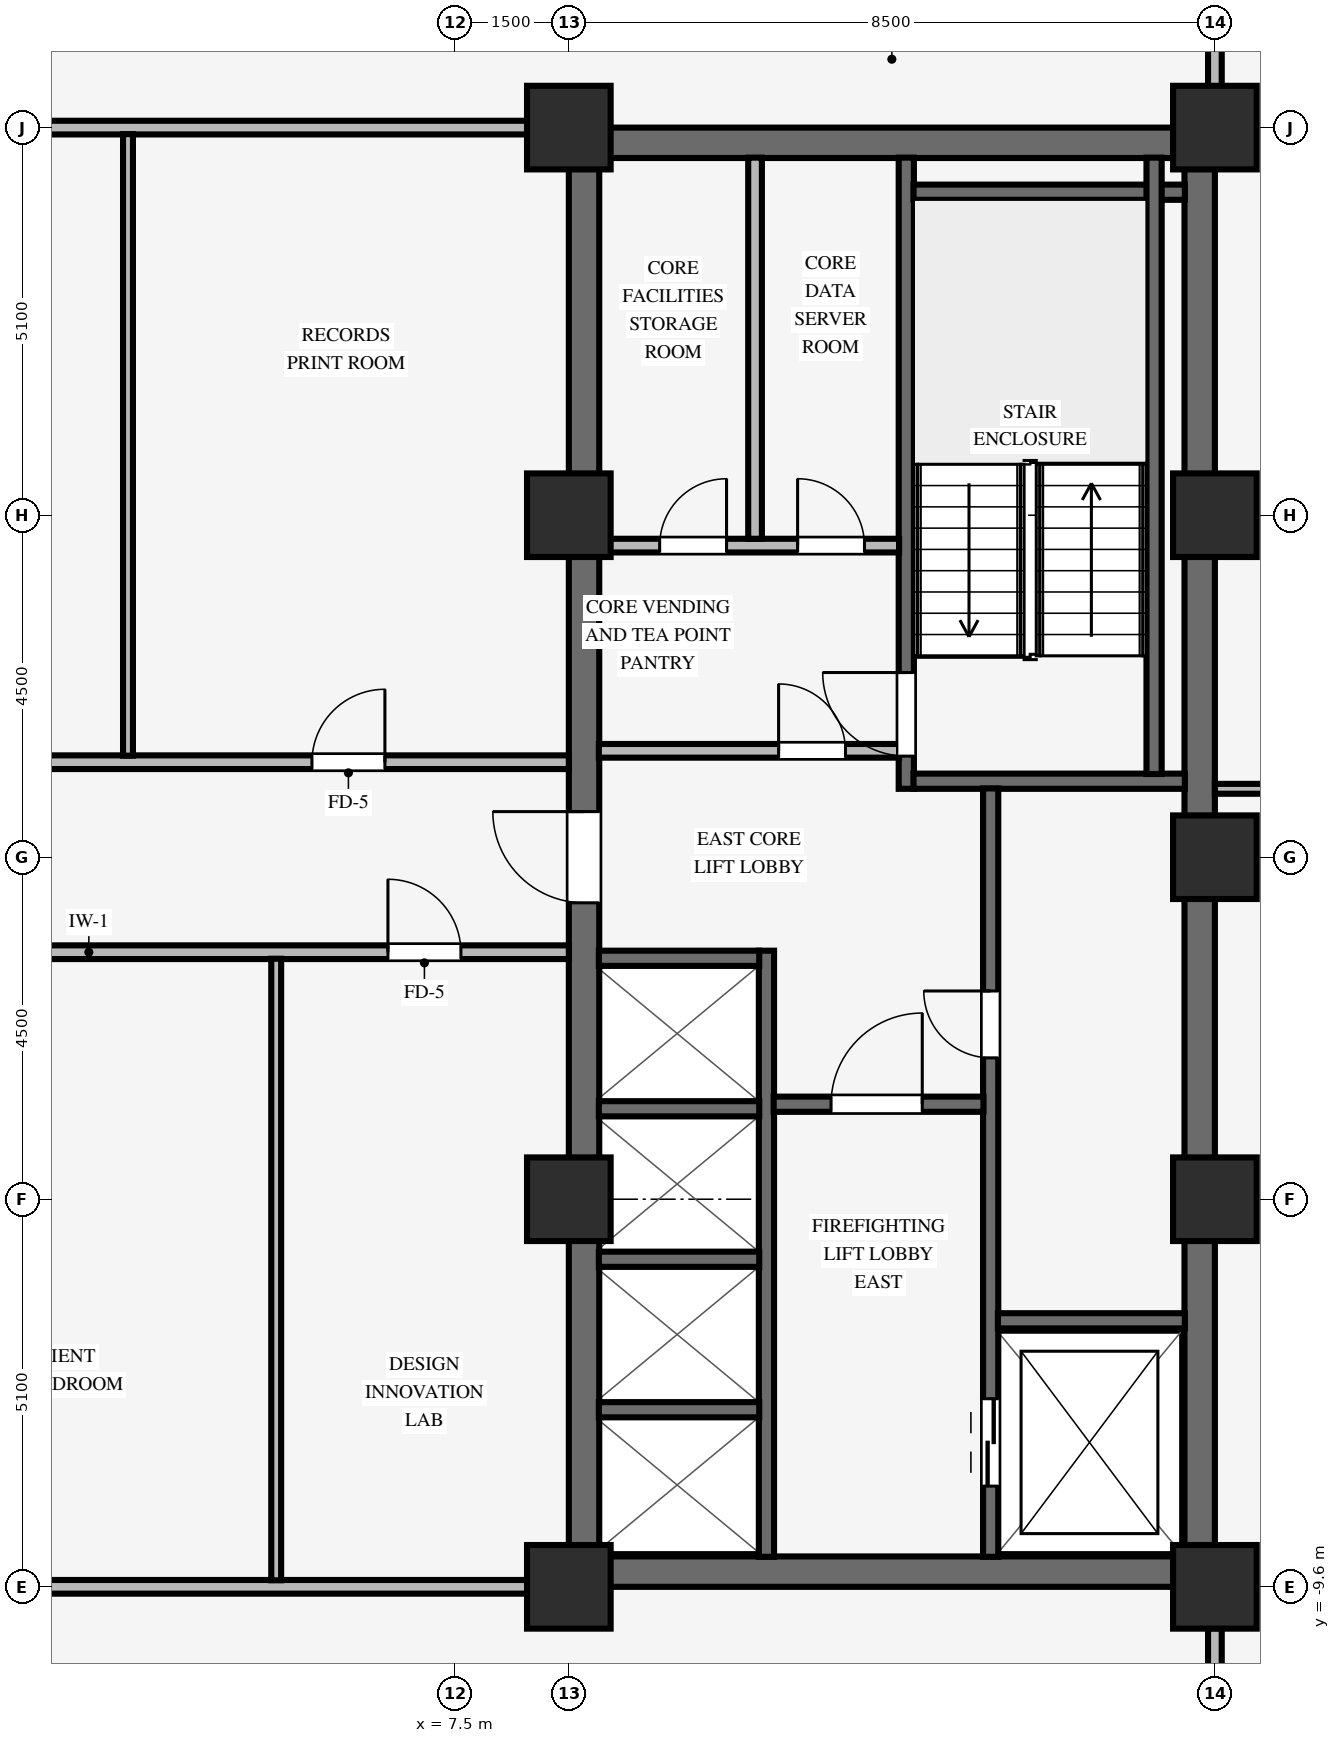
"""IFC4 building model, lengths in metres.
Left out: names, types, materials, properties, quantities, classifications, styles, units other than length and angle.
Written with IfcOpenShell. Run it as: python <this file> out.ifc"""

import sys

from ifc_helpers import new_model, si_unit, direction, frame, frame_2d, origin, origin_2d, place, context, subcontext, project, spatial, rectangle, extrude, source, transform, mapped, element, fill, save


model = new_model("IFC4")
c1 = context("Model", 3, precision=1e-05, world=origin(), true_north=direction((0.0, 1.0)))
c2 = subcontext(c1, "Body", "Model", "MODEL_VIEW")
j1 = project(units=[si_unit("LENGTHUNIT", "METRE"), si_unit("PLANEANGLEUNIT", "RADIAN")], contexts=[c1])
p1 = place(None, origin())
s1 = spatial("IfcSite", under=j1, at=p1, CompositionType="ELEMENT")
p2 = place(p1, origin())
s2 = spatial("IfcBuilding", under=s1, at=p2, CompositionType="ELEMENT")
p3 = place(p2, frame((0.0, 0.0, 112.9)))
s3 = spatial("IfcBuildingStorey", under=s2, at=p3, CompositionType="ELEMENT", Elevation=112.9)
for number, where, z_axis, x_axis in (
    (1, (9.0, -9.4, 0.0), (0.0, 0.0, 1.0), (1.0, 0.0, 0.0)),
    (2, (9.0, 9.4, 0.0), (0.0, 0.0, 1.0), (1.0, 0.0, 0.0)),
):
    element("IfcWall", number, at=place(p3, frame(where, z_axis=z_axis, x_axis=x_axis)), inside=s3, PredefinedType="SHEAR", context=c2, shape_type="SweptSolid", body=[
        extrude(rectangle(XDim=8.5, YDim=0.4, at=frame_2d((4.25, 0.0))), origin(), (0.0, 0.0, 1.0), 3.25),
    ])
p4 = place(p3, frame((9.2, -9.205, 0.0), z_axis=(0.0, 0.0, 1.0), x_axis=(0.0, 1.0, 0.0)))
e3 = element("IfcWall", 3, at=p4, inside=s3, PredefinedType="SHEAR", context=c2, shape_type="SweptSolid", body=[
    extrude(rectangle(XDim=18.41, YDim=0.4, at=frame_2d((9.205, 0.0))), origin(), (0.0, 0.0, 1.0), 3.25),
])
p5 = place(p4, frame((8.605, 0.0, 0.0)))
e4 = element("IfcOpeningElement", 4, at=p5, cuts=e3, PredefinedType="OPENING", context=c2, shape_type="SweptSolid", body=[
    extrude(rectangle(XDim=1.2, YDim=2.15, at=frame_2d((0.6, 1.075))), frame((0.0, 0.21, 0.0), z_axis=(0.0, -1.0, 0.0), x_axis=(1.0, 0.0, 0.0)), (0.0, 0.0, 1.0), 0.42),
])
p6 = place(p3, frame((17.3, -9.205, 0.0), z_axis=(0.0, 0.0, 1.0), x_axis=(0.0, 1.0, 0.0)))
e5 = element("IfcWall", 5, at=p6, inside=s3, PredefinedType="SHEAR", context=c2, shape_type="SweptSolid", body=[
    extrude(rectangle(XDim=18.41, YDim=0.4, at=frame_2d((9.205, 0.0))), origin(), (0.0, 0.0, 1.0), 3.25),
])
for number, where, z_axis, x_axis in (
    (6, (9.0, -9.6, 0.0), (0.0, 0.0, 1.0), (1.0, 0.0, 0.0)),
    (7, (9.0, -4.5, 0.0), (0.0, 0.0, 1.0), (1.0, 0.0, 0.0)),
    (8, (9.0, 4.5, 0.0), (0.0, 0.0, 1.0), (1.0, 0.0, 0.0)),
    (9, (9.0, 9.6, 0.0), (0.0, 0.0, 1.0), (1.0, 0.0, 0.0)),
    (10, (17.5, -9.6, 0.0), (0.0, 0.0, 1.0), (1.0, 0.0, 0.0)),
    (11, (17.5, -4.5, 0.0), (0.0, 0.0, 1.0), (1.0, 0.0, 0.0)),
    (12, (17.5, 4.5, 0.0), (0.0, 0.0, 1.0), (1.0, 0.0, 0.0)),
    (13, (17.5, 9.6, 0.0), (0.0, 0.0, 1.0), (1.0, 0.0, 0.0)),
    (14, (17.5, 0.0, 0.0), (0.0, 0.0, 1.0), (1.0, 0.0, 0.0)),
):
    element("IfcColumn", number, at=place(p3, frame(where, z_axis=z_axis, x_axis=x_axis)), inside=s3, PredefinedType="COLUMN", context=c2, shape_type="SweptSolid", body=[
        extrude(rectangle(XDim=1.1, YDim=1.1, at=origin_2d()), origin(), (0.0, 0.0, 1.0), 3.25),
    ])
p7 = place(p3, frame((13.44, 0.9, 0.0), z_axis=(0.0, 0.0, 1.0), x_axis=(0.0, 1.0, 0.0)))
e15 = element("IfcWall", 15, at=p7, inside=s3, PredefinedType="SHEAR", context=c2, shape_type="SweptSolid", body=[
    extrude(rectangle(XDim=8.305, YDim=0.2, at=frame_2d((4.153, 0.0))), origin(), (0.0, 0.0, 1.0), 3.25),
])
p8 = place(p7, frame((0.43, 0.0, 0.0)))
e16 = element("IfcOpeningElement", 16, at=p8, cuts=e15, PredefinedType="OPENING", context=c2, shape_type="SweptSolid", body=[
    extrude(rectangle(XDim=1.1, YDim=2.15, at=frame_2d((0.55, 1.075))), frame((0.0, 0.11, 0.0), z_axis=(0.0, -1.0, 0.0), x_axis=(1.0, 0.0, 0.0)), (0.0, 0.0, 1.0), 0.22),
])
for number, where, z_axis, x_axis in (
    (17, (13.535, 1.0, 0.0), (0.0, 0.0, 1.0), (1.0, 0.0, 0.0)),
    (18, (13.535, 8.75, 0.0), (0.0, 0.0, 1.0), (1.0, 0.0, 0.0)),
):
    element("IfcWall", number, at=place(p3, frame(where, z_axis=z_axis, x_axis=x_axis)), inside=s3, PredefinedType="SHEAR", context=c2, shape_type="SweptSolid", body=[
        extrude(rectangle(XDim=3.57, YDim=0.2, at=frame_2d((1.785, 0.0))), origin(), (0.0, 0.0, 1.0), 3.25),
    ])
p9 = place(p3, frame((16.7, 1.095, 0.0), z_axis=(0.0, 0.0, 1.0), x_axis=(0.0, 1.0, 0.0)))
e19 = element("IfcWall", 19, at=p9, inside=s3, PredefinedType="SHEAR", context=c2, shape_type="SweptSolid", body=[
    extrude(rectangle(XDim=8.11, YDim=0.2, at=frame_2d((4.055, 0.0))), origin(), (0.0, 0.0, 1.0), 3.25),
])
p10 = place(p3, frame((14.55, -9.205, 0.0), z_axis=(0.0, 0.0, 1.0), x_axis=(0.0, 1.0, 0.0)))
e20 = element("IfcWall", 20, at=p10, inside=s3, PredefinedType="SHEAR", context=c2, shape_type="SweptSolid", body=[
    extrude(rectangle(XDim=10.11, YDim=0.2, at=frame_2d((5.055, 0.0))), origin(), (0.0, 0.0, 1.0), 3.25),
])
p11 = place(p10, frame((6.565, 0.0, 0.0)))
e21 = element("IfcOpeningElement", 21, at=p11, cuts=e20, PredefinedType="OPENING", context=c2, shape_type="SweptSolid", body=[
    extrude(rectangle(XDim=0.88, YDim=2.1, at=frame_2d((0.44, 1.05))), frame((0.0, 0.11, 0.0), z_axis=(0.0, -1.0, 0.0), x_axis=(1.0, 0.0, 0.0)), (0.0, 0.0, 1.0), 0.22),
])
p12 = place(p10, frame((0.93, 0.0, 0.0)))
e22 = element("IfcOpeningElement", 22, at=p12, cuts=e20, PredefinedType="OPENING", context=c2, shape_type="SweptSolid", body=[
    extrude(rectangle(XDim=1.15, YDim=2.15, at=frame_2d((0.575, 1.075))), frame((0.0, 0.11, 0.0), z_axis=(0.0, -1.0, 0.0), x_axis=(1.0, 0.0, 0.0)), (0.0, 0.0, 1.0), 0.22),
])
p13 = place(p3, frame((14.645, -6.1, 0.0), z_axis=(0.0, 0.0, 1.0), x_axis=(1.0, 0.0, 0.0)))
e23 = element("IfcWall", 23, at=p13, inside=s3, PredefinedType="SHEAR", context=c2, shape_type="SweptSolid", body=[
    extrude(rectangle(XDim=2.46, YDim=0.2, at=frame_2d((1.23, 0.0))), origin(), (0.0, 0.0, 1.0), 3.25),
])
p14 = place(p3, frame((11.6, -9.205, 0.0), z_axis=(0.0, 0.0, 1.0), x_axis=(0.0, 1.0, 0.0)))
e24 = element("IfcWall", 24, at=p14, inside=s3, PredefinedType="SHEAR", context=c2, shape_type="SweptSolid", body=[
    extrude(rectangle(XDim=7.975, YDim=0.2, at=frame_2d((3.988, 0.0))), origin(), (0.0, 0.0, 1.0), 3.25),
])
p15 = place(p3, frame((11.695, -3.25, 0.0), z_axis=(0.0, 0.0, 1.0), x_axis=(1.0, 0.0, 0.0)))
e25 = element("IfcWall", 25, at=p15, inside=s3, PredefinedType="SHEAR", context=c2, shape_type="SweptSolid", body=[
    extrude(rectangle(XDim=2.76, YDim=0.2, at=frame_2d((1.38, 0.0))), origin(), (0.0, 0.0, 1.0), 3.25),
])
p16 = place(p15, frame((0.755, 0.0, 0.0)))
e26 = element("IfcOpeningElement", 26, at=p16, cuts=e25, PredefinedType="OPENING", context=c2, shape_type="SweptSolid", body=[
    extrude(rectangle(XDim=1.2, YDim=2.15, at=frame_2d((0.6, 1.075))), frame((0.0, 0.11, 0.0), z_axis=(0.0, -1.0, 0.0), x_axis=(1.0, 0.0, 0.0)), (0.0, 0.0, 1.0), 0.22),
])
for number, where, z_axis, x_axis in (
    (27, (9.395, -7.27, 0.0), (0.0, 0.0, 1.0), (1.0, 0.0, 0.0)),
    (28, (9.395, -5.29, 0.0), (0.0, 0.0, 1.0), (1.0, 0.0, 0.0)),
    (29, (9.395, -3.31, 0.0), (0.0, 0.0, 1.0), (1.0, 0.0, 0.0)),
    (30, (9.395, -1.33, 0.0), (0.0, 0.0, 1.0), (1.0, 0.0, 0.0)),
):
    element("IfcWall", number, at=place(p3, frame(where, z_axis=z_axis, x_axis=x_axis)), inside=s3, PredefinedType="SHEAR", context=c2, shape_type="SweptSolid", body=[
        extrude(rectangle(XDim=2.11, YDim=0.2, at=frame_2d((1.055, 0.0))), origin(), (0.0, 0.0, 1.0), 3.25),
    ])
p17 = place(p3, frame((9.395, 1.4, 0.0), z_axis=(0.0, 0.0, 1.0), x_axis=(1.0, 0.0, 0.0)))
e31 = element("IfcWall", 31, at=p17, inside=s3, PredefinedType="PARTITIONING", context=c2, shape_type="SweptSolid", body=[
    extrude(rectangle(XDim=3.95, YDim=0.18, at=frame_2d((1.975, 0.0))), origin(), (0.0, 0.0, 1.0), 3.24),
])
p18 = place(p17, frame((2.365, 0.0, 0.0)))
e32 = element("IfcOpeningElement", 32, at=p18, cuts=e31, PredefinedType="OPENING", context=c2, shape_type="SweptSolid", body=[
    extrude(rectangle(XDim=0.88, YDim=2.1, at=frame_2d((0.44, 1.05))), frame((0.0, 0.1, 0.0), z_axis=(0.0, -1.0, 0.0), x_axis=(1.0, 0.0, 0.0)), (0.0, 0.0, 1.0), 0.2),
])
p19 = place(p3, frame((9.395, 4.1, 0.0), z_axis=(0.0, 0.0, 1.0), x_axis=(1.0, 0.0, 0.0)))
e33 = element("IfcWall", 33, at=p19, inside=s3, PredefinedType="PARTITIONING", context=c2, shape_type="SweptSolid", body=[
    extrude(rectangle(XDim=3.95, YDim=0.18, at=frame_2d((1.975, 0.0))), origin(), (0.0, 0.0, 1.0), 3.24),
])
p20 = place(p19, frame((0.8, 0.0, 0.0)))
e34 = element("IfcOpeningElement", 34, at=p20, cuts=e33, PredefinedType="OPENING", context=c2, shape_type="SweptSolid", body=[
    extrude(rectangle(XDim=0.88, YDim=2.1, at=frame_2d((0.44, 1.05))), frame((0.0, 0.1, 0.0), z_axis=(0.0, -1.0, 0.0), x_axis=(1.0, 0.0, 0.0)), (0.0, 0.0, 1.0), 0.2),
])
p21 = place(p19, frame((2.615, 0.0, 0.0)))
e35 = element("IfcOpeningElement", 35, at=p21, cuts=e33, PredefinedType="OPENING", context=c2, shape_type="SweptSolid", body=[
    extrude(rectangle(XDim=0.88, YDim=2.1, at=frame_2d((0.44, 1.05))), frame((0.0, 0.1, 0.0), z_axis=(0.0, -1.0, 0.0), x_axis=(1.0, 0.0, 0.0)), (0.0, 0.0, 1.0), 0.2),
])
p22 = place(p3, frame((11.45, 4.19, 0.0), z_axis=(0.0, 0.0, 1.0), x_axis=(0.0, 1.0, 0.0)))
e36 = element("IfcWall", 36, at=p22, inside=s3, PredefinedType="PARTITIONING", context=c2, shape_type="SweptSolid", body=[
    extrude(rectangle(XDim=5.015, YDim=0.18, at=frame_2d((2.508, 0.0))), origin(), (0.0, 0.0, 1.0), 3.24),
])
p23 = place(p3, frame((0.176, -9.6, 0.0), z_axis=(0.0, 0.0, 1.0), x_axis=(1.0, 0.0, 0.0)))
e37 = element("IfcWall", 37, at=p23, inside=s3, PredefinedType="PARTITIONING", context=c2, shape_type="SweptSolid", body=[
    extrude(rectangle(XDim=8.278, YDim=0.18, at=frame_2d((4.139, 0.0))), origin(), (0.0, 0.0, 1.0), 2.285),
])
p24 = place(p3, frame((-0.8, -1.25, 0.0), z_axis=(0.0, 0.0, 1.0), x_axis=(1.0, 0.0, 0.0)))
e38 = element("IfcWall", 38, at=p24, inside=s3, PredefinedType="PARTITIONING", context=c2, shape_type="SweptSolid", body=[
    extrude(rectangle(XDim=9.8, YDim=0.18, at=frame_2d((4.9, 0.0))), origin(), (0.0, 0.0, 1.0), 3.24),
])
p25 = place(p24, frame((7.42, 0.0, 0.0)))
e39 = element("IfcOpeningElement", 39, at=p25, cuts=e38, PredefinedType="OPENING", context=c2, shape_type="SweptSolid", body=[
    extrude(rectangle(XDim=0.96, YDim=2.1, at=frame_2d((0.48, 1.05))), frame((0.0, 0.1, 0.0), z_axis=(0.0, -1.0, 0.0), x_axis=(1.0, 0.0, 0.0)), (0.0, 0.0, 1.0), 0.2),
])
p26 = place(p3, frame((17.5, 0.9, 0.0), z_axis=(0.0, 0.0, 1.0), x_axis=(1.0, 0.0, 0.0)))
e40 = element("IfcWall", 40, at=p26, inside=s3, PredefinedType="PARTITIONING", context=c2, shape_type="SweptSolid", body=[
    extrude(rectangle(XDim=6.18, YDim=0.13, at=frame_2d((3.09, 0.0))), origin(), (0.0, 0.0, 1.0), 3.24),
])
p27 = place(p3, frame((-0.8, 1.25, 0.0), z_axis=(0.0, 0.0, 1.0), x_axis=(1.0, 0.0, 0.0)))
e41 = element("IfcWall", 41, at=p27, inside=s3, PredefinedType="PARTITIONING", context=c2, shape_type="SweptSolid", body=[
    extrude(rectangle(XDim=9.8, YDim=0.18, at=frame_2d((4.9, 0.0))), origin(), (0.0, 0.0, 1.0), 3.24),
])
p28 = place(p27, frame((6.42, 0.0, 0.0)))
e42 = element("IfcOpeningElement", 42, at=p28, cuts=e41, PredefinedType="OPENING", context=c2, shape_type="SweptSolid", body=[
    extrude(rectangle(XDim=0.96, YDim=2.1, at=frame_2d((0.48, 1.05))), frame((0.0, 0.1, 0.0), z_axis=(0.0, -1.0, 0.0), x_axis=(1.0, 0.0, 0.0)), (0.0, 0.0, 1.0), 0.2),
])
p29 = place(p3, frame((0.176, 9.6, 0.0), z_axis=(0.0, 0.0, 1.0), x_axis=(1.0, 0.0, 0.0)))
e43 = element("IfcWall", 43, at=p29, inside=s3, PredefinedType="PARTITIONING", context=c2, shape_type="SweptSolid", body=[
    extrude(rectangle(XDim=8.278, YDim=0.18, at=frame_2d((4.139, 0.0))), origin(), (0.0, 0.0, 1.0), 2.285),
])
for number, where, z_axis, x_axis in (
    (44, (3.2, 1.336, 0.0), (0.0, 0.0, 1.0), (0.0, 1.0, 0.0)),
    (45, (5.15, -9.514, 0.0), (0.0, 0.0, 1.0), (0.0, 1.0, 0.0)),
):
    element("IfcWall", number, at=place(p3, frame(where, z_axis=z_axis, x_axis=x_axis)), inside=s3, PredefinedType="PARTITIONING", context=c2, shape_type="SweptSolid", body=[
        extrude(rectangle(XDim=8.178, YDim=0.13, at=frame_2d((4.089, 0.0))), origin(), (0.0, 0.0, 1.0), 3.24),
    ])
for number, where, z_axis, x_axis in (
    (46, (17.5, -11.114, 0.0), (0.0, 0.0, 1.0), (0.0, 1.0, 0.0)),
    (47, (17.5, 10.146, 0.0), (0.0, 0.0, 1.0), (0.0, 1.0, 0.0)),
):
    element("IfcWall", number, at=place(p3, frame(where, z_axis=z_axis, x_axis=x_axis)), inside=s3, PredefinedType="PARTITIONING", context=c2, shape_type="SweptSolid", body=[
        extrude(rectangle(XDim=0.968, YDim=0.18, at=frame_2d((0.484, 0.0))), origin(), (0.0, 0.0, 1.0), 2.618),
    ])
m1 = source(origin(), c2, "Body", "SweptSolid", [
    extrude(rectangle(XDim=1.1, YDim=2.15, at=frame_2d((0.55, 1.075))), frame((0.0, 0.025, 0.0), z_axis=(0.0, -1.0, 0.0), x_axis=(1.0, 0.0, 0.0)), (0.0, 0.0, 1.0), 0.05),
])
p30 = place(p8, origin())
e48 = element("IfcDoor", 48, at=p30, inside=s3, OperationType="SINGLE_SWING_RIGHT", PredefinedType="DOOR", context=c2, shape_type="MappedRepresentation", body=[
    mapped(m1, transform((0.0, 0.0, 0.0), scale=1.0)),
])
fill(e16, e48)
m2 = source(origin(), c2, "Body", "SweptSolid", [
    extrude(rectangle(XDim=0.88, YDim=2.1, at=frame_2d((0.44, 1.05))), frame((0.0, 0.025, 0.0), z_axis=(0.0, -1.0, 0.0), x_axis=(1.0, 0.0, 0.0)), (0.0, 0.0, 1.0), 0.05),
])
p31 = place(p11, origin())
e49 = element("IfcDoor", 49, at=p31, inside=s3, OperationType="SINGLE_SWING_RIGHT", PredefinedType="DOOR", context=c2, shape_type="MappedRepresentation", body=[
    mapped(m2, transform((0.0, 0.0, 0.0), scale=1.0)),
])
fill(e21, e49)
m3 = source(origin(), c2, "Body", "SweptSolid", [
    extrude(rectangle(XDim=1.2, YDim=2.15, at=frame_2d((0.6, 1.075))), frame((0.0, 0.025, 0.0), z_axis=(0.0, -1.0, 0.0), x_axis=(1.0, 0.0, 0.0)), (0.0, 0.0, 1.0), 0.05),
])
p32 = place(p16, origin())
e50 = element("IfcDoor", 50, at=p32, inside=s3, OperationType="SINGLE_SWING_RIGHT", PredefinedType="DOOR", context=c2, shape_type="MappedRepresentation", body=[
    mapped(m3, transform((0.0, 0.0, 0.0), scale=1.0)),
])
fill(e26, e50)
p33 = place(p5, origin())
e51 = element("IfcDoor", 51, at=p33, inside=s3, OperationType="SINGLE_SWING_RIGHT", PredefinedType="DOOR", context=c2, shape_type="MappedRepresentation", body=[
    mapped(m3, transform((0.0, 0.0, 0.0), scale=1.0)),
])
fill(e4, e51)
p34 = place(p18, origin())
e52 = element("IfcDoor", 52, at=p34, inside=s3, OperationType="SINGLE_SWING_LEFT", PredefinedType="DOOR", context=c2, shape_type="MappedRepresentation", body=[
    mapped(m2, transform((0.0, 0.0, 0.0), scale=1.0)),
])
fill(e32, e52)
p35 = place(p20, origin())
e53 = element("IfcDoor", 53, at=p35, inside=s3, OperationType="SINGLE_SWING_RIGHT", PredefinedType="DOOR", context=c2, shape_type="MappedRepresentation", body=[
    mapped(m2, transform((0.0, 0.0, 0.0), scale=1.0)),
])
fill(e34, e53)
p36 = place(p21, origin())
e54 = element("IfcDoor", 54, at=p36, inside=s3, OperationType="SINGLE_SWING_LEFT", PredefinedType="DOOR", context=c2, shape_type="MappedRepresentation", body=[
    mapped(m2, transform((0.0, 0.0, 0.0), scale=1.0)),
])
fill(e35, e54)
m4 = source(origin(), c2, "Body", "SweptSolid", [
    extrude(rectangle(XDim=1.15, YDim=2.15, at=frame_2d((0.575, 1.075))), frame((0.0, 0.025, 0.0), z_axis=(0.0, -1.0, 0.0), x_axis=(1.0, 0.0, 0.0)), (0.0, 0.0, 1.0), 0.05),
])
p37 = place(p12, origin())
e55 = element("IfcDoor", 55, at=p37, inside=s3, OperationType="DOUBLE_DOOR_SLIDING", PredefinedType="DOOR", context=c2, shape_type="MappedRepresentation", body=[
    mapped(m4, transform((0.0, 0.0, 0.0), scale=1.0)),
])
fill(e22, e55)
m5 = source(origin(), c2, "Body", "SweptSolid", [
    extrude(rectangle(XDim=0.96, YDim=2.1, at=frame_2d((0.48, 1.05))), frame((0.0, 0.025, 0.0), z_axis=(0.0, -1.0, 0.0), x_axis=(1.0, 0.0, 0.0)), (0.0, 0.0, 1.0), 0.05),
])
p38 = place(p28, origin())
e56 = element("IfcDoor", 56, at=p38, inside=s3, OperationType="SINGLE_SWING_RIGHT", PredefinedType="DOOR", context=c2, shape_type="MappedRepresentation", body=[
    mapped(m5, transform((0.0, 0.0, 0.0), scale=1.0)),
])
fill(e42, e56)
p39 = place(p25, origin())
e57 = element("IfcDoor", 57, at=p39, inside=s3, OperationType="SINGLE_SWING_LEFT", PredefinedType="DOOR", context=c2, shape_type="MappedRepresentation", body=[
    mapped(m5, transform((0.0, 0.0, 0.0), scale=1.0)),
])
fill(e39, e57)
save(model, sys.argv[1])
